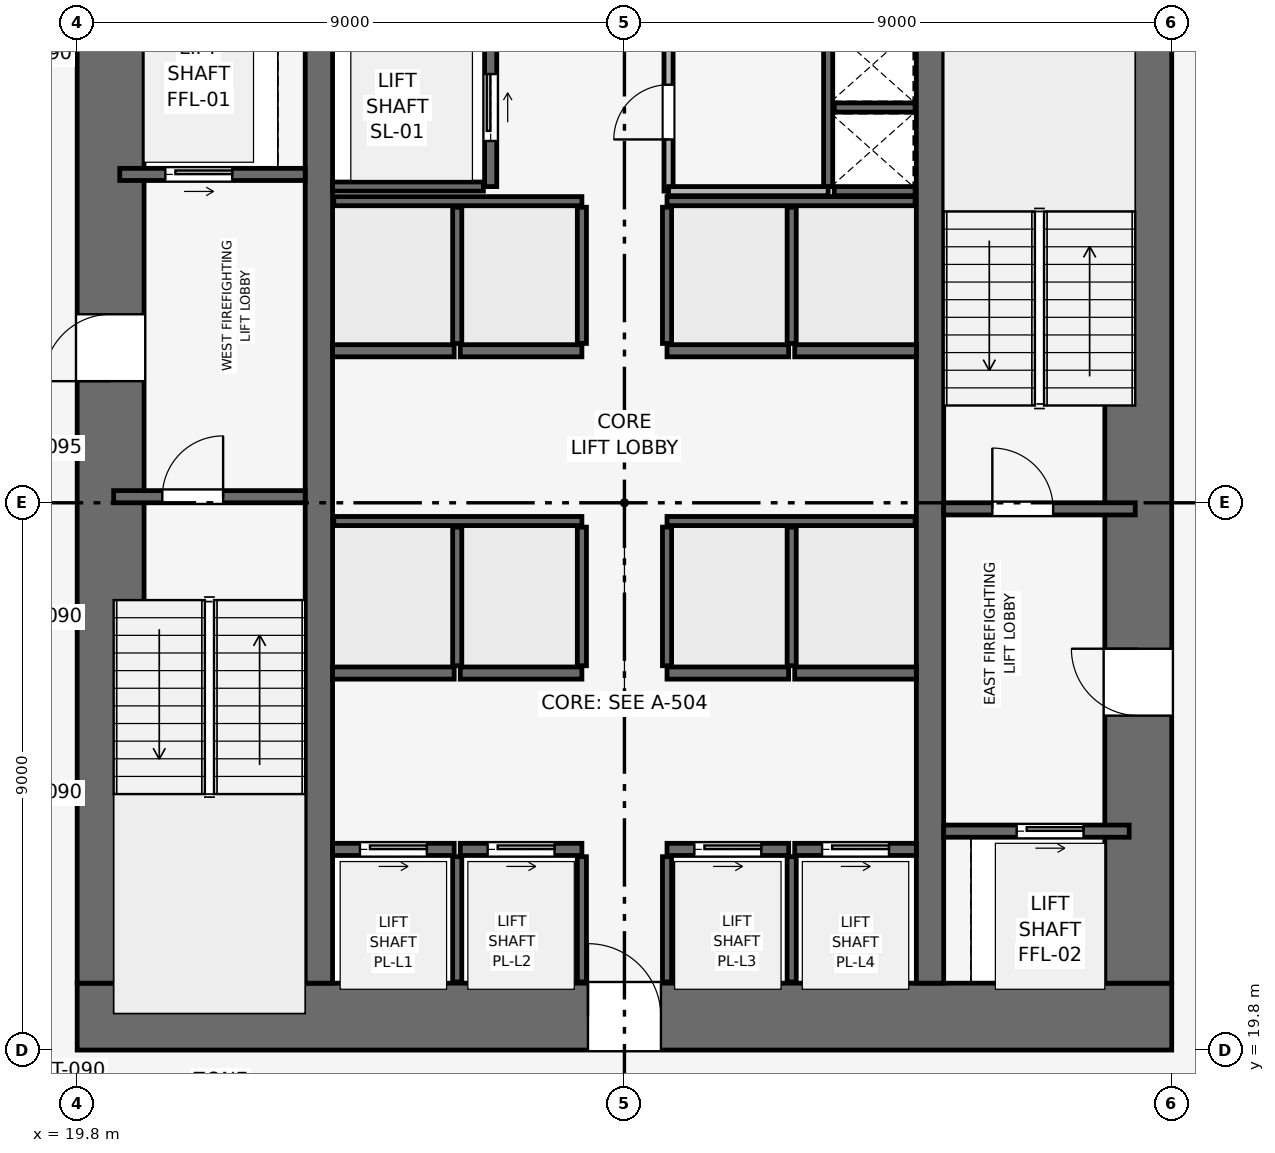
"""IFC4 building model, lengths in metres.
Left out: names, types, materials, properties, quantities, classifications, styles, units other than length and angle.
Written with IfcOpenShell. Run it as: python <this file> out.ifc"""

import sys

from ifc_helpers import new_model, si_unit, direction, frame, frame_2d, origin, place, context, subcontext, project, spatial, rectangle, extrude, element, fill, save


model = new_model("IFC4")
c1 = context("Model", 3, precision=1e-05, world=origin(), true_north=direction((0.0, 1.0)))
c2 = subcontext(c1, "Body", "Model", "MODEL_VIEW")
j1 = project(units=[si_unit("LENGTHUNIT", "METRE"), si_unit("PLANEANGLEUNIT", "RADIAN")], contexts=[c1])
p1 = place(None, origin())
s1 = spatial("IfcSite", under=j1, at=p1, CompositionType="ELEMENT")
p2 = place(p1, origin())
s2 = spatial("IfcBuilding", under=s1, at=p2, CompositionType="ELEMENT")
p3 = place(p2, frame((0.0, 0.0, 49.5)))
s3 = spatial("IfcBuildingStorey", under=s2, at=p3, CompositionType="ELEMENT", Elevation=49.5)
p4 = place(p3, frame((19.8, 20.35, 0.0), z_axis=(0.0, 0.0, 1.0), x_axis=(1.0, 0.0, 0.0)))
e1 = element("IfcWall", 1, at=p4, inside=s3, PredefinedType="SHEAR", context=c2, shape_type="SweptSolid", body=[
    extrude(rectangle(XDim=18.0, YDim=1.1, at=frame_2d((9.0, 0.0))), origin(), (0.0, 0.0, 1.0), 3.9),
])
p5 = place(p4, frame((8.4, 0.0, 0.0)))
e2 = element("IfcOpeningElement", 2, at=p5, cuts=e1, PredefinedType="OPENING", context=c2, shape_type="SweptSolid", body=[
    extrude(rectangle(XDim=1.2, YDim=2.2, at=frame_2d((0.6, 1.1))), frame((0.0, 0.56, 0.0), z_axis=(0.0, -1.0, 0.0), x_axis=(1.0, 0.0, 0.0)), (0.0, 0.0, 1.0), 1.12),
])
p6 = place(p3, frame((20.35, 20.9, 0.0), z_axis=(0.0, 0.0, 1.0), x_axis=(0.0, 1.0, 0.0)))
e3 = element("IfcWall", 3, at=p6, inside=s3, PredefinedType="SHEAR", context=c2, shape_type="SweptSolid", body=[
    extrude(rectangle(XDim=15.8, YDim=1.1, at=frame_2d((7.9, 0.0))), origin(), (0.0, 0.0, 1.0), 3.9),
])
p7 = place(p6, frame((9.9, 0.0, 0.0)))
e4 = element("IfcOpeningElement", 4, at=p7, cuts=e3, PredefinedType="OPENING", context=c2, shape_type="SweptSolid", body=[
    extrude(rectangle(XDim=1.1, YDim=2.15, at=frame_2d((0.55, 1.075))), frame((0.0, 0.56, 0.0), z_axis=(0.0, -1.0, 0.0), x_axis=(1.0, 0.0, 0.0)), (0.0, 0.0, 1.0), 1.12),
])
p8 = place(p3, frame((37.25, 20.9, 0.0), z_axis=(0.0, 0.0, 1.0), x_axis=(0.0, 1.0, 0.0)))
e5 = element("IfcWall", 5, at=p8, inside=s3, PredefinedType="SHEAR", context=c2, shape_type="SweptSolid", body=[
    extrude(rectangle(XDim=15.8, YDim=1.1, at=frame_2d((7.9, 0.0))), origin(), (0.0, 0.0, 1.0), 3.9),
])
p9 = place(p8, frame((4.4, 0.0, 0.0)))
e6 = element("IfcOpeningElement", 6, at=p9, cuts=e5, PredefinedType="OPENING", context=c2, shape_type="SweptSolid", body=[
    extrude(rectangle(XDim=1.1, YDim=2.15, at=frame_2d((0.55, 1.075))), frame((0.0, 0.56, 0.0), z_axis=(0.0, -1.0, 0.0), x_axis=(1.0, 0.0, 0.0)), (0.0, 0.0, 1.0), 1.12),
])
for number, where, z_axis, x_axis in (
    (7, (23.775, 20.9, 0.0), (0.0, 0.0, 1.0), (0.0, 1.0, 0.0)),
    (8, (33.825, 20.9, 0.0), (0.0, 0.0, 1.0), (0.0, 1.0, 0.0)),
):
    element("IfcWall", number, at=place(p3, frame(where, z_axis=z_axis, x_axis=x_axis)), inside=s3, PredefinedType="SHEAR", context=c2, shape_type="SweptSolid", body=[
        extrude(rectangle(XDim=15.8, YDim=0.45, at=frame_2d((7.9, 0.0))), origin(), (0.0, 0.0, 1.0), 3.9),
    ])
p10 = place(p3, frame((20.4, 28.9, 0.0), z_axis=(0.0, 0.0, 1.0), x_axis=(1.0, 0.0, 0.0)))
e9 = element("IfcWall", 9, at=p10, inside=s3, PredefinedType="SHEAR", context=c2, shape_type="SweptSolid", body=[
    extrude(rectangle(XDim=3.15, YDim=0.2, at=frame_2d((1.575, 0.0))), origin(), (0.0, 0.0, 1.0), 3.65),
])
p11 = place(p10, frame((0.8, 0.0, 0.0)))
e10 = element("IfcOpeningElement", 10, at=p11, cuts=e9, PredefinedType="OPENING", context=c2, shape_type="SweptSolid", body=[
    extrude(rectangle(XDim=1.0, YDim=2.1, at=frame_2d((0.5, 1.05))), frame((0.0, 0.11, 0.0), z_axis=(0.0, -1.0, 0.0), x_axis=(1.0, 0.0, 0.0)), (0.0, 0.0, 1.0), 0.22),
])
p12 = place(p3, frame((34.05, 28.7, 0.0), z_axis=(0.0, 0.0, 1.0), x_axis=(1.0, 0.0, 0.0)))
e11 = element("IfcWall", 11, at=p12, inside=s3, PredefinedType="SHEAR", context=c2, shape_type="SweptSolid", body=[
    extrude(rectangle(XDim=3.15, YDim=0.2, at=frame_2d((1.575, 0.0))), origin(), (0.0, 0.0, 1.0), 3.65),
])
p13 = place(p12, frame((0.8, 0.0, 0.0)))
e12 = element("IfcOpeningElement", 12, at=p13, cuts=e11, PredefinedType="OPENING", context=c2, shape_type="SweptSolid", body=[
    extrude(rectangle(XDim=1.0, YDim=2.1, at=frame_2d((0.5, 1.05))), frame((0.0, 0.11, 0.0), z_axis=(0.0, -1.0, 0.0), x_axis=(1.0, 0.0, 0.0)), (0.0, 0.0, 1.0), 0.22),
])
p14 = place(p3, frame((32.15, 34.0, 0.0), z_axis=(0.0, 0.0, 1.0), x_axis=(0.0, 1.0, 0.0)))
e13 = element("IfcWall", 13, at=p14, inside=s3, PredefinedType="SHEAR", context=c2, shape_type="SweptSolid", body=[
    extrude(rectangle(XDim=2.7, YDim=0.15, at=frame_2d((1.35, 0.0))), origin(), (0.0, 0.0, 1.0), 3.65),
])
for number, where, z_axis, x_axis in (
    (14, (32.25, 33.925, 0.0), (0.0, 0.0, 1.0), (1.0, 0.0, 0.0)),
    (15, (32.25, 35.3, 0.0), (0.0, 0.0, 1.0), (1.0, 0.0, 0.0)),
):
    element("IfcWall", number, at=place(p3, frame(where, z_axis=z_axis, x_axis=x_axis)), inside=s3, PredefinedType="SHEAR", context=c2, shape_type="SweptSolid", body=[
        extrude(rectangle(XDim=1.33, YDim=0.15, at=frame_2d((0.665, 0.0))), origin(), (0.0, 0.0, 1.0), 3.65),
    ])
p15 = place(p3, frame((20.5, 34.2, 0.0), z_axis=(0.0, 0.0, 1.0), x_axis=(1.0, 0.0, 0.0)))
e16 = element("IfcWall", 16, at=p15, inside=s3, PredefinedType="SHEAR", context=c2, shape_type="SweptSolid", body=[
    extrude(rectangle(XDim=3.05, YDim=0.2, at=frame_2d((1.525, 0.0))), origin(), (0.0, 0.0, 1.0), 3.65),
])
p16 = place(p15, frame((0.75, 0.0, 0.0)))
e17 = element("IfcOpeningElement", 17, at=p16, cuts=e16, PredefinedType="OPENING", context=c2, shape_type="SweptSolid", body=[
    extrude(rectangle(XDim=1.1, YDim=2.15, at=frame_2d((0.55, 1.075))), frame((0.0, 0.11, 0.0), z_axis=(0.0, -1.0, 0.0), x_axis=(1.0, 0.0, 0.0)), (0.0, 0.0, 1.0), 0.22),
])
p17 = place(p3, frame((34.05, 23.4, 0.0), z_axis=(0.0, 0.0, 1.0), x_axis=(1.0, 0.0, 0.0)))
e18 = element("IfcWall", 18, at=p17, inside=s3, PredefinedType="SHEAR", context=c2, shape_type="SweptSolid", body=[
    extrude(rectangle(XDim=3.05, YDim=0.2, at=frame_2d((1.525, 0.0))), origin(), (0.0, 0.0, 1.0), 3.65),
])
p18 = place(p17, frame((1.2, 0.0, 0.0)))
e19 = element("IfcOpeningElement", 19, at=p18, cuts=e18, PredefinedType="OPENING", context=c2, shape_type="SweptSolid", body=[
    extrude(rectangle(XDim=1.1, YDim=2.15, at=frame_2d((0.55, 1.075))), frame((0.0, 0.11, 0.0), z_axis=(0.0, -1.0, 0.0), x_axis=(1.0, 0.0, 0.0)), (0.0, 0.0, 1.0), 0.22),
])
p19 = place(p3, frame((26.6, 34.0, 0.0), z_axis=(0.0, 0.0, 1.0), x_axis=(0.0, 1.0, 0.0)))
e20 = element("IfcWall", 20, at=p19, inside=s3, PredefinedType="SHEAR", context=c2, shape_type="SweptSolid", body=[
    extrude(rectangle(XDim=2.7, YDim=0.2, at=frame_2d((1.35, 0.0))), origin(), (0.0, 0.0, 1.0), 3.65),
])
p20 = place(p19, frame((0.75, 0.0, 0.0)))
e21 = element("IfcOpeningElement", 21, at=p20, cuts=e20, PredefinedType="OPENING", context=c2, shape_type="SweptSolid", body=[
    extrude(rectangle(XDim=1.1, YDim=2.15, at=frame_2d((0.55, 1.075))), frame((0.0, 0.11, 0.0), z_axis=(0.0, -1.0, 0.0), x_axis=(1.0, 0.0, 0.0)), (0.0, 0.0, 1.0), 0.22),
])
p21 = place(p3, frame((24.0, 34.0, 0.0), z_axis=(0.0, 0.0, 1.0), x_axis=(1.0, 0.0, 0.0)))
e22 = element("IfcWall", 22, at=p21, inside=s3, PredefinedType="SHEAR", context=c2, shape_type="SweptSolid", body=[
    extrude(rectangle(XDim=2.48, YDim=0.15, at=frame_2d((1.24, 0.0))), origin(), (0.0, 0.0, 1.0), 3.65),
])
p22 = place(p3, frame((24.0, 23.1, 0.0), z_axis=(0.0, 0.0, 1.0), x_axis=(1.0, 0.0, 0.0)))
e23 = element("IfcWall", 23, at=p22, inside=s3, PredefinedType="SHEAR", context=c2, shape_type="SweptSolid", body=[
    extrude(rectangle(XDim=2.0, YDim=0.2, at=frame_2d((1.0, 0.0))), origin(), (0.0, 0.0, 1.0), 3.65),
])
p23 = place(p22, frame((0.45, 0.0, 0.0)))
e24 = element("IfcOpeningElement", 24, at=p23, cuts=e23, PredefinedType="OPENING", context=c2, shape_type="SweptSolid", body=[
    extrude(rectangle(XDim=1.1, YDim=2.15, at=frame_2d((0.55, 1.075))), frame((0.0, 0.11, 0.0), z_axis=(0.0, -1.0, 0.0), x_axis=(1.0, 0.0, 0.0)), (0.0, 0.0, 1.0), 0.22),
])
p24 = place(p3, frame((26.1, 23.1, 0.0), z_axis=(0.0, 0.0, 1.0), x_axis=(1.0, 0.0, 0.0)))
e25 = element("IfcWall", 25, at=p24, inside=s3, PredefinedType="SHEAR", context=c2, shape_type="SweptSolid", body=[
    extrude(rectangle(XDim=2.0, YDim=0.2, at=frame_2d((1.0, 0.0))), origin(), (0.0, 0.0, 1.0), 3.65),
])
p25 = place(p24, frame((0.45, 0.0, 0.0)))
e26 = element("IfcOpeningElement", 26, at=p25, cuts=e25, PredefinedType="OPENING", context=c2, shape_type="SweptSolid", body=[
    extrude(rectangle(XDim=1.1, YDim=2.15, at=frame_2d((0.55, 1.075))), frame((0.0, 0.11, 0.0), z_axis=(0.0, -1.0, 0.0), x_axis=(1.0, 0.0, 0.0)), (0.0, 0.0, 1.0), 0.22),
])
p26 = place(p3, frame((29.5, 23.1, 0.0), z_axis=(0.0, 0.0, 1.0), x_axis=(1.0, 0.0, 0.0)))
e27 = element("IfcWall", 27, at=p26, inside=s3, PredefinedType="SHEAR", context=c2, shape_type="SweptSolid", body=[
    extrude(rectangle(XDim=2.0, YDim=0.2, at=frame_2d((1.0, 0.0))), origin(), (0.0, 0.0, 1.0), 3.65),
])
p27 = place(p26, frame((0.45, 0.0, 0.0)))
e28 = element("IfcOpeningElement", 28, at=p27, cuts=e27, PredefinedType="OPENING", context=c2, shape_type="SweptSolid", body=[
    extrude(rectangle(XDim=1.1, YDim=2.15, at=frame_2d((0.55, 1.075))), frame((0.0, 0.11, 0.0), z_axis=(0.0, -1.0, 0.0), x_axis=(1.0, 0.0, 0.0)), (0.0, 0.0, 1.0), 0.22),
])
p28 = place(p3, frame((31.6, 23.1, 0.0), z_axis=(0.0, 0.0, 1.0), x_axis=(1.0, 0.0, 0.0)))
e29 = element("IfcWall", 29, at=p28, inside=s3, PredefinedType="SHEAR", context=c2, shape_type="SweptSolid", body=[
    extrude(rectangle(XDim=2.0, YDim=0.2, at=frame_2d((1.0, 0.0))), origin(), (0.0, 0.0, 1.0), 3.65),
])
p29 = place(p28, frame((0.45, 0.0, 0.0)))
e30 = element("IfcOpeningElement", 30, at=p29, cuts=e29, PredefinedType="OPENING", context=c2, shape_type="SweptSolid", body=[
    extrude(rectangle(XDim=1.1, YDim=2.15, at=frame_2d((0.55, 1.075))), frame((0.0, 0.11, 0.0), z_axis=(0.0, -1.0, 0.0), x_axis=(1.0, 0.0, 0.0)), (0.0, 0.0, 1.0), 0.22),
])
for number, where, z_axis, x_axis in (
    (31, (24.0, 26.0, 0.0), (0.0, 0.0, 1.0), (1.0, 0.0, 0.0)),
    (32, (26.1, 26.0, 0.0), (0.0, 0.0, 1.0), (1.0, 0.0, 0.0)),
    (33, (29.5, 26.0, 0.0), (0.0, 0.0, 1.0), (1.0, 0.0, 0.0)),
    (34, (31.6, 26.0, 0.0), (0.0, 0.0, 1.0), (1.0, 0.0, 0.0)),
    (35, (24.0, 31.3, 0.0), (0.0, 0.0, 1.0), (1.0, 0.0, 0.0)),
    (36, (26.1, 31.3, 0.0), (0.0, 0.0, 1.0), (1.0, 0.0, 0.0)),
    (37, (29.5, 31.3, 0.0), (0.0, 0.0, 1.0), (1.0, 0.0, 0.0)),
    (38, (31.6, 31.3, 0.0), (0.0, 0.0, 1.0), (1.0, 0.0, 0.0)),
):
    element("IfcWall", number, at=place(p3, frame(where, z_axis=z_axis, x_axis=x_axis)), inside=s3, PredefinedType="SHEAR", context=c2, shape_type="SweptSolid", body=[
        extrude(rectangle(XDim=2.0, YDim=0.2, at=frame_2d((1.0, 0.0))), origin(), (0.0, 0.0, 1.0), 3.65),
    ])
for number, where, z_axis, x_axis in (
    (39, (26.05, 20.92, 0.0), (0.0, 0.0, 1.0), (0.0, 1.0, 0.0)),
    (40, (28.1, 20.92, 0.0), (0.0, 0.0, 1.0), (0.0, 1.0, 0.0)),
    (41, (29.5, 20.92, 0.0), (0.0, 0.0, 1.0), (0.0, 1.0, 0.0)),
    (42, (31.55, 20.92, 0.0), (0.0, 0.0, 1.0), (0.0, 1.0, 0.0)),
):
    element("IfcWall", number, at=place(p3, frame(where, z_axis=z_axis, x_axis=x_axis)), inside=s3, PredefinedType="SHEAR", context=c2, shape_type="SweptSolid", body=[
        extrude(rectangle(XDim=2.06, YDim=0.15, at=frame_2d((1.03, 0.0))), origin(), (0.0, 0.0, 1.0), 3.65),
    ])
for number, where, z_axis, x_axis in (
    (43, (24.02, 28.5, 0.0), (0.0, 0.0, 1.0), (1.0, 0.0, 0.0)),
    (44, (29.5, 28.5, 0.0), (0.0, 0.0, 1.0), (1.0, 0.0, 0.0)),
):
    element("IfcWall", number, at=place(p3, frame(where, z_axis=z_axis, x_axis=x_axis)), inside=s3, PredefinedType="SHEAR", context=c2, shape_type="SweptSolid", body=[
        extrude(rectangle(XDim=4.08, YDim=0.15, at=frame_2d((2.04, 0.0))), origin(), (0.0, 0.0, 1.0), 3.65),
    ])
for number, where, z_axis, x_axis in (
    (45, (26.05, 26.12, 0.0), (0.0, 0.0, 1.0), (0.0, 1.0, 0.0)),
    (46, (28.1, 26.12, 0.0), (0.0, 0.0, 1.0), (0.0, 1.0, 0.0)),
    (47, (29.5, 26.12, 0.0), (0.0, 0.0, 1.0), (0.0, 1.0, 0.0)),
    (48, (31.55, 26.12, 0.0), (0.0, 0.0, 1.0), (0.0, 1.0, 0.0)),
):
    element("IfcWall", number, at=place(p3, frame(where, z_axis=z_axis, x_axis=x_axis)), inside=s3, PredefinedType="SHEAR", context=c2, shape_type="SweptSolid", body=[
        extrude(rectangle(XDim=2.28, YDim=0.15, at=frame_2d((1.14, 0.0))), origin(), (0.0, 0.0, 1.0), 3.65),
    ])
for number, where, z_axis, x_axis in (
    (49, (24.02, 33.76, 0.0), (0.0, 0.0, 1.0), (1.0, 0.0, 0.0)),
    (50, (29.5, 33.76, 0.0), (0.0, 0.0, 1.0), (1.0, 0.0, 0.0)),
):
    element("IfcWall", number, at=place(p3, frame(where, z_axis=z_axis, x_axis=x_axis)), inside=s3, PredefinedType="SHEAR", context=c2, shape_type="SweptSolid", body=[
        extrude(rectangle(XDim=4.08, YDim=0.15, at=frame_2d((2.04, 0.0))), origin(), (0.0, 0.0, 1.0), 3.65),
    ])
for number, where, z_axis, x_axis in (
    (51, (26.05, 31.42, 0.0), (0.0, 0.0, 1.0), (0.0, 1.0, 0.0)),
    (52, (28.1, 31.42, 0.0), (0.0, 0.0, 1.0), (0.0, 1.0, 0.0)),
    (53, (29.5, 31.42, 0.0), (0.0, 0.0, 1.0), (0.0, 1.0, 0.0)),
    (54, (31.55, 31.42, 0.0), (0.0, 0.0, 1.0), (0.0, 1.0, 0.0)),
):
    element("IfcWall", number, at=place(p3, frame(where, z_axis=z_axis, x_axis=x_axis)), inside=s3, PredefinedType="SHEAR", context=c2, shape_type="SweptSolid", body=[
        extrude(rectangle(XDim=2.24, YDim=0.15, at=frame_2d((1.12, 0.0))), origin(), (0.0, 0.0, 1.0), 3.65),
    ])
p30 = place(p3, frame((29.525, 33.925, 0.0), z_axis=(0.0, 0.0, 1.0), x_axis=(0.0, 1.0, 0.0)))
e55 = element("IfcWall", 55, at=p30, inside=s3, PredefinedType="PARTITIONING", context=c2, shape_type="SweptSolid", body=[
    extrude(rectangle(XDim=2.775, YDim=0.15, at=frame_2d((1.387, 0.0))), origin(), (0.0, 0.0, 1.0), 3.65),
])
p31 = place(p30, frame((0.85, 0.0, 0.0)))
e56 = element("IfcOpeningElement", 56, at=p31, cuts=e55, PredefinedType="OPENING", context=c2, shape_type="SweptSolid", body=[
    extrude(rectangle(XDim=0.9, YDim=2.1, at=frame_2d((0.45, 1.05))), frame((0.0, 0.085, 0.0), z_axis=(0.0, -1.0, 0.0), x_axis=(1.0, 0.0, 0.0)), (0.0, 0.0, 1.0), 0.17),
])
p32 = place(p3, frame((29.525, 33.925, 0.0), z_axis=(0.0, 0.0, 1.0), x_axis=(1.0, 0.0, 0.0)))
e57 = element("IfcWall", 57, at=p32, inside=s3, PredefinedType="PARTITIONING", context=c2, shape_type="SweptSolid", body=[
    extrude(rectangle(XDim=2.625, YDim=0.15, at=frame_2d((1.312, 0.0))), origin(), (0.0, 0.0, 1.0), 3.65),
])
p33 = place(p11, origin())
e58 = element("IfcDoor", 58, at=p33, inside=s3, OperationType="SINGLE_SWING_RIGHT", PredefinedType="DOOR", context=c2, shape_type="SweptSolid", body=[
    extrude(rectangle(XDim=1.0, YDim=2.1, at=frame_2d((0.5, 1.05))), frame((0.0, 0.025, 0.0), z_axis=(0.0, -1.0, 0.0), x_axis=(1.0, 0.0, 0.0)), (0.0, 0.0, 1.0), 0.05),
])
fill(e10, e58)
p34 = place(p13, origin())
e59 = element("IfcDoor", 59, at=p34, inside=s3, OperationType="SINGLE_SWING_LEFT", PredefinedType="DOOR", context=c2, shape_type="SweptSolid", body=[
    extrude(rectangle(XDim=1.0, YDim=2.1, at=frame_2d((0.5, 1.05))), frame((0.0, 0.025, 0.0), z_axis=(0.0, -1.0, 0.0), x_axis=(1.0, 0.0, 0.0)), (0.0, 0.0, 1.0), 0.05),
])
fill(e12, e59)
p35 = place(p16, origin())
e60 = element("IfcDoor", 60, at=p35, inside=s3, OperationType="SLIDING_TO_RIGHT", PredefinedType="DOOR", context=c2, shape_type="SweptSolid", body=[
    extrude(rectangle(XDim=1.1, YDim=2.15, at=frame_2d((0.55, 1.075))), frame((0.0, 0.025, 0.0), z_axis=(0.0, -1.0, 0.0), x_axis=(1.0, 0.0, 0.0)), (0.0, 0.0, 1.0), 0.05),
])
fill(e17, e60)
p36 = place(p18, origin())
e61 = element("IfcDoor", 61, at=p36, inside=s3, OperationType="SLIDING_TO_RIGHT", PredefinedType="DOOR", context=c2, shape_type="SweptSolid", body=[
    extrude(rectangle(XDim=1.1, YDim=2.15, at=frame_2d((0.55, 1.075))), frame((0.0, 0.025, 0.0), z_axis=(0.0, -1.0, 0.0), x_axis=(1.0, 0.0, 0.0)), (0.0, 0.0, 1.0), 0.05),
])
fill(e19, e61)
p37 = place(p20, origin())
e62 = element("IfcDoor", 62, at=p37, inside=s3, OperationType="SLIDING_TO_RIGHT", PredefinedType="DOOR", context=c2, shape_type="SweptSolid", body=[
    extrude(rectangle(XDim=1.1, YDim=2.15, at=frame_2d((0.55, 1.075))), frame((0.0, 0.025, 0.0), z_axis=(0.0, -1.0, 0.0), x_axis=(1.0, 0.0, 0.0)), (0.0, 0.0, 1.0), 0.05),
])
fill(e21, e62)
p38 = place(p23, origin())
e63 = element("IfcDoor", 63, at=p38, inside=s3, OperationType="SLIDING_TO_RIGHT", PredefinedType="DOOR", context=c2, shape_type="SweptSolid", body=[
    extrude(rectangle(XDim=1.1, YDim=2.15, at=frame_2d((0.55, 1.075))), frame((0.0, 0.025, 0.0), z_axis=(0.0, -1.0, 0.0), x_axis=(1.0, 0.0, 0.0)), (0.0, 0.0, 1.0), 0.05),
])
fill(e24, e63)
p39 = place(p25, origin())
e64 = element("IfcDoor", 64, at=p39, inside=s3, OperationType="SLIDING_TO_RIGHT", PredefinedType="DOOR", context=c2, shape_type="SweptSolid", body=[
    extrude(rectangle(XDim=1.1, YDim=2.15, at=frame_2d((0.55, 1.075))), frame((0.0, 0.025, 0.0), z_axis=(0.0, -1.0, 0.0), x_axis=(1.0, 0.0, 0.0)), (0.0, 0.0, 1.0), 0.05),
])
fill(e26, e64)
p40 = place(p27, origin())
e65 = element("IfcDoor", 65, at=p40, inside=s3, OperationType="SLIDING_TO_RIGHT", PredefinedType="DOOR", context=c2, shape_type="SweptSolid", body=[
    extrude(rectangle(XDim=1.1, YDim=2.15, at=frame_2d((0.55, 1.075))), frame((0.0, 0.025, 0.0), z_axis=(0.0, -1.0, 0.0), x_axis=(1.0, 0.0, 0.0)), (0.0, 0.0, 1.0), 0.05),
])
fill(e28, e65)
p41 = place(p29, origin())
e66 = element("IfcDoor", 66, at=p41, inside=s3, OperationType="SLIDING_TO_RIGHT", PredefinedType="DOOR", context=c2, shape_type="SweptSolid", body=[
    extrude(rectangle(XDim=1.1, YDim=2.15, at=frame_2d((0.55, 1.075))), frame((0.0, 0.025, 0.0), z_axis=(0.0, -1.0, 0.0), x_axis=(1.0, 0.0, 0.0)), (0.0, 0.0, 1.0), 0.05),
])
fill(e30, e66)
p42 = place(p31, origin())
e67 = element("IfcDoor", 67, at=p42, inside=s3, OperationType="SINGLE_SWING_LEFT", PredefinedType="DOOR", context=c2, shape_type="SweptSolid", body=[
    extrude(rectangle(XDim=0.9, YDim=2.1, at=frame_2d((0.45, 1.05))), frame((0.0, 0.025, 0.0), z_axis=(0.0, -1.0, 0.0), x_axis=(1.0, 0.0, 0.0)), (0.0, 0.0, 1.0), 0.05),
])
fill(e56, e67)
p43 = place(p7, origin())
e68 = element("IfcDoor", 68, at=p43, inside=s3, OperationType="SINGLE_SWING_LEFT", PredefinedType="DOOR", context=c2, shape_type="SweptSolid", body=[
    extrude(rectangle(XDim=1.1, YDim=2.15, at=frame_2d((0.55, 1.075))), frame((0.0, 0.025, 0.0), z_axis=(0.0, -1.0, 0.0), x_axis=(1.0, 0.0, 0.0)), (0.0, 0.0, 1.0), 0.05),
])
fill(e4, e68)
p44 = place(p9, origin())
e69 = element("IfcDoor", 69, at=p44, inside=s3, OperationType="SINGLE_SWING_RIGHT", PredefinedType="DOOR", context=c2, shape_type="SweptSolid", body=[
    extrude(rectangle(XDim=1.1, YDim=2.15, at=frame_2d((0.55, 1.075))), frame((0.0, 0.025, 0.0), z_axis=(0.0, -1.0, 0.0), x_axis=(1.0, 0.0, 0.0)), (0.0, 0.0, 1.0), 0.05),
])
fill(e6, e69)
p45 = place(p5, origin())
e70 = element("IfcDoor", 70, at=p45, inside=s3, OperationType="SINGLE_SWING_LEFT", PredefinedType="DOOR", context=c2, shape_type="SweptSolid", body=[
    extrude(rectangle(XDim=1.2, YDim=2.2, at=frame_2d((0.6, 1.1))), frame((0.0, 0.025, 0.0), z_axis=(0.0, -1.0, 0.0), x_axis=(1.0, 0.0, 0.0)), (0.0, 0.0, 1.0), 0.05),
])
fill(e2, e70)
save(model, sys.argv[1])
